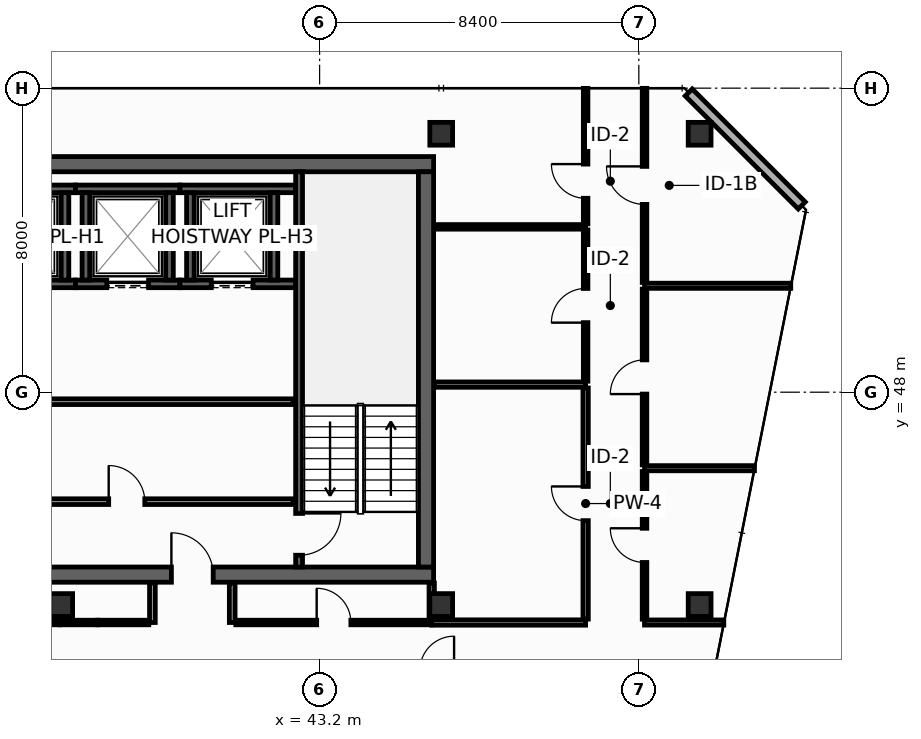
"""IFC4 building model, lengths in metres.
Left out: names, types, materials, properties, quantities, classifications, styles, units other than length and angle.
Written with IfcOpenShell. Run it as: python <this file> out.ifc"""

import sys

from ifc_helpers import new_model, si_unit, direction, frame, frame_2d, origin, origin_2d, place, context, subcontext, project, spatial, rectangle, hollow_rectangle, extrude, element, fill, save


model = new_model("IFC4")
c1 = context("Model", 3, precision=1e-05, world=origin(), true_north=direction((0.0, 1.0)))
c2 = subcontext(c1, "Body", "Model", "MODEL_VIEW")
j1 = project(units=[si_unit("LENGTHUNIT", "METRE"), si_unit("PLANEANGLEUNIT", "RADIAN")], contexts=[c1])
p1 = place(None, origin())
s1 = spatial("IfcSite", under=j1, at=p1, CompositionType="ELEMENT")
p2 = place(p1, origin())
s2 = spatial("IfcBuilding", under=s1, at=p2, CompositionType="ELEMENT")
p3 = place(p2, frame((0.0, 0.0, 306.6)))
s3 = spatial("IfcBuildingStorey", under=s2, at=p3, CompositionType="ELEMENT", Elevation=306.6)
p4 = place(p3, frame((13.7, 43.2, 0.0), z_axis=(0.0, 0.0, 1.0), x_axis=(1.0, 0.0, 0.0)))
e1 = element("IfcWall", 1, at=p4, inside=s3, PredefinedType="SHEAR", context=c2, shape_type="SweptSolid", body=[
    extrude(rectangle(XDim=32.5, YDim=0.4, at=frame_2d((16.25, 0.0))), origin(), (0.0, 0.0, 1.0), 3.55),
])
p5 = place(p4, frame((5.4, 0.0, 0.0)))
e2 = element("IfcOpeningElement", 2, at=p5, cuts=e1, PredefinedType="OPENING", context=c2, shape_type="SweptSolid", body=[
    extrude(rectangle(XDim=1.1, YDim=2.15, at=frame_2d((0.55, 1.075))), frame((0.0, 0.21, 0.0), z_axis=(0.0, -1.0, 0.0), x_axis=(1.0, 0.0, 0.0)), (0.0, 0.0, 1.0), 0.42),
])
p6 = place(p4, frame((25.6, 0.0, 0.0)))
e3 = element("IfcOpeningElement", 3, at=p6, cuts=e1, PredefinedType="OPENING", context=c2, shape_type="SweptSolid", body=[
    extrude(rectangle(XDim=1.1, YDim=2.15, at=frame_2d((0.55, 1.075))), frame((0.0, 0.21, 0.0), z_axis=(0.0, -1.0, 0.0), x_axis=(1.0, 0.0, 0.0)), (0.0, 0.0, 1.0), 0.42),
])
p7 = place(p3, frame((13.7, 54.0, 0.0), z_axis=(0.0, 0.0, 1.0), x_axis=(1.0, 0.0, 0.0)))
e4 = element("IfcWall", 4, at=p7, inside=s3, PredefinedType="SHEAR", context=c2, shape_type="SweptSolid", body=[
    extrude(rectangle(XDim=32.5, YDim=0.4, at=frame_2d((16.25, 0.0))), origin(), (0.0, 0.0, 1.0), 3.55),
])
p8 = place(p3, frame((46.0, 43.4, 0.0), z_axis=(0.0, 0.0, 1.0), x_axis=(0.0, 1.0, 0.0)))
e5 = element("IfcWall", 5, at=p8, inside=s3, PredefinedType="SHEAR", context=c2, shape_type="SweptSolid", body=[
    extrude(rectangle(XDim=10.4, YDim=0.4, at=frame_2d((5.2, 0.0))), origin(), (0.0, 0.0, 1.0), 3.55),
])
for number, where, z_axis, x_axis in (
    (6, (46.4, 54.8, 0.0), (0.0, 0.0, 1.0), (1.0, 0.0, 0.0)),
    (7, (53.2, 54.8, 0.0), (0.0, 0.0, 1.0), (1.0, 0.0, 0.0)),
    (8, (36.4, 42.4, 0.0), (0.0, 0.0, 1.0), (1.0, 0.0, 0.0)),
    (9, (46.4, 42.4, 0.0), (0.0, 0.0, 1.0), (1.0, 0.0, 0.0)),
    (10, (53.2, 42.4, 0.0), (0.0, 0.0, 1.0), (1.0, 0.0, 0.0)),
):
    element("IfcColumn", number, at=place(p3, frame(where, z_axis=z_axis, x_axis=x_axis)), inside=s3, PredefinedType="COLUMN", context=c2, shape_type="SweptSolid", body=[
        extrude(hollow_rectangle(XDim=0.6, YDim=0.6, WallThickness=0.028, at=origin_2d()), origin(), (0.0, 0.0, 1.0), 3.8),
    ])
p9 = place(p3, frame((34.2, 50.85, 0.0), z_axis=(0.0, 0.0, 1.0), x_axis=(1.0, 0.0, 0.0)))
e11 = element("IfcWall", 11, at=p9, inside=s3, PredefinedType="SHEAR", context=c2, shape_type="SweptSolid", body=[
    extrude(rectangle(XDim=2.575, YDim=0.2, at=frame_2d((1.288, 0.0))), origin(), (0.0, 0.0, 1.0), 3.55),
])
p10 = place(p9, frame((0.65, 0.0, 0.0)))
e12 = element("IfcOpeningElement", 12, at=p10, cuts=e11, PredefinedType="OPENING", context=c2, shape_type="SweptSolid", body=[
    extrude(rectangle(XDim=1.1, YDim=2.2, at=frame_2d((0.55, 1.1))), frame((0.0, 0.11, 0.0), z_axis=(0.0, -1.0, 0.0), x_axis=(1.0, 0.0, 0.0)), (0.0, 0.0, 1.0), 0.22),
])
p11 = place(p3, frame((34.2, 53.35, 0.0), z_axis=(0.0, 0.0, 1.0), x_axis=(1.0, 0.0, 0.0)))
e13 = element("IfcWall", 13, at=p11, inside=s3, PredefinedType="SHEAR", context=c2, shape_type="SweptSolid", body=[
    extrude(rectangle(XDim=2.575, YDim=0.2, at=frame_2d((1.288, 0.0))), origin(), (0.0, 0.0, 1.0), 3.55),
])
p12 = place(p3, frame((36.5, 50.95, 0.0), z_axis=(0.0, 0.0, 1.0), x_axis=(0.0, 1.0, 0.0)))
e14 = element("IfcWall", 14, at=p12, inside=s3, PredefinedType="SHEAR", context=c2, shape_type="SweptSolid", body=[
    extrude(rectangle(XDim=2.3, YDim=0.2, at=frame_2d((1.15, 0.0))), origin(), (0.0, 0.0, 1.0), 3.55),
])
p13 = place(p3, frame((36.775, 50.85, 0.0), z_axis=(0.0, 0.0, 1.0), x_axis=(1.0, 0.0, 0.0)))
e15 = element("IfcWall", 15, at=p13, inside=s3, PredefinedType="SHEAR", context=c2, shape_type="SweptSolid", body=[
    extrude(rectangle(XDim=2.75, YDim=0.2, at=frame_2d((1.375, 0.0))), origin(), (0.0, 0.0, 1.0), 3.55),
])
p14 = place(p13, frame((0.825, 0.0, 0.0)))
e16 = element("IfcOpeningElement", 16, at=p14, cuts=e15, PredefinedType="OPENING", context=c2, shape_type="SweptSolid", body=[
    extrude(rectangle(XDim=1.1, YDim=2.2, at=frame_2d((0.55, 1.1))), frame((0.0, 0.11, 0.0), z_axis=(0.0, -1.0, 0.0), x_axis=(1.0, 0.0, 0.0)), (0.0, 0.0, 1.0), 0.22),
])
p15 = place(p3, frame((36.775, 53.35, 0.0), z_axis=(0.0, 0.0, 1.0), x_axis=(1.0, 0.0, 0.0)))
e17 = element("IfcWall", 17, at=p15, inside=s3, PredefinedType="SHEAR", context=c2, shape_type="SweptSolid", body=[
    extrude(rectangle(XDim=2.75, YDim=0.2, at=frame_2d((1.375, 0.0))), origin(), (0.0, 0.0, 1.0), 3.55),
])
for number, where, z_axis, x_axis in (
    (18, (37.05, 50.95, 0.0), (0.0, 0.0, 1.0), (0.0, 1.0, 0.0)),
    (19, (39.25, 50.95, 0.0), (0.0, 0.0, 1.0), (0.0, 1.0, 0.0)),
):
    element("IfcWall", number, at=place(p3, frame(where, z_axis=z_axis, x_axis=x_axis)), inside=s3, PredefinedType="SHEAR", context=c2, shape_type="SweptSolid", body=[
        extrude(rectangle(XDim=2.3, YDim=0.2, at=frame_2d((1.15, 0.0))), origin(), (0.0, 0.0, 1.0), 3.55),
    ])
p16 = place(p3, frame((39.525, 50.85, 0.0), z_axis=(0.0, 0.0, 1.0), x_axis=(1.0, 0.0, 0.0)))
e20 = element("IfcWall", 20, at=p16, inside=s3, PredefinedType="SHEAR", context=c2, shape_type="SweptSolid", body=[
    extrude(rectangle(XDim=3.045, YDim=0.2, at=frame_2d((1.522, 0.0))), origin(), (0.0, 0.0, 1.0), 3.55),
])
p17 = place(p16, frame((0.825, 0.0, 0.0)))
e21 = element("IfcOpeningElement", 21, at=p17, cuts=e20, PredefinedType="OPENING", context=c2, shape_type="SweptSolid", body=[
    extrude(rectangle(XDim=1.1, YDim=2.2, at=frame_2d((0.55, 1.1))), frame((0.0, 0.11, 0.0), z_axis=(0.0, -1.0, 0.0), x_axis=(1.0, 0.0, 0.0)), (0.0, 0.0, 1.0), 0.22),
])
p18 = place(p3, frame((39.525, 53.35, 0.0), z_axis=(0.0, 0.0, 1.0), x_axis=(1.0, 0.0, 0.0)))
e22 = element("IfcWall", 22, at=p18, inside=s3, PredefinedType="SHEAR", context=c2, shape_type="SweptSolid", body=[
    extrude(rectangle(XDim=3.045, YDim=0.2, at=frame_2d((1.522, 0.0))), origin(), (0.0, 0.0, 1.0), 3.55),
])
for number, where, z_axis, x_axis in (
    (23, (39.8, 50.95, 0.0), (0.0, 0.0, 1.0), (0.0, 1.0, 0.0)),
    (24, (42.0, 50.95, 0.0), (0.0, 0.0, 1.0), (0.0, 1.0, 0.0)),
):
    element("IfcWall", number, at=place(p3, frame(where, z_axis=z_axis, x_axis=x_axis)), inside=s3, PredefinedType="SHEAR", context=c2, shape_type="SweptSolid", body=[
        extrude(rectangle(XDim=2.3, YDim=0.2, at=frame_2d((1.15, 0.0))), origin(), (0.0, 0.0, 1.0), 3.55),
    ])
p19 = place(p3, frame((42.66, 53.8, 0.0), z_axis=(0.0, 0.0, 1.0), x_axis=(0.0, -1.0, 0.0)))
e25 = element("IfcWall", 25, at=p19, inside=s3, PredefinedType="SHEAR", context=c2, shape_type="SweptSolid", body=[
    extrude(rectangle(XDim=10.4, YDim=0.18, at=frame_2d((5.2, 0.0))), origin(), (0.0, 0.0, 1.0), 3.55),
])
p20 = place(p19, frame((8.99, 0.0, 0.0)))
e26 = element("IfcOpeningElement", 26, at=p20, cuts=e25, PredefinedType="OPENING", context=c2, shape_type="SweptSolid", body=[
    extrude(rectangle(XDim=1.1, YDim=2.15, at=frame_2d((0.55, 1.075))), frame((0.0, 0.1, 0.0), z_axis=(0.0, -1.0, 0.0), x_axis=(1.0, 0.0, 0.0)), (0.0, 0.0, 1.0), 0.2),
])
p21 = place(p3, frame((34.05, 45.12, 0.0), z_axis=(0.0, 0.0, 1.0), x_axis=(1.0, 0.0, 0.0)))
e27 = element("IfcWall", 27, at=p21, inside=s3, PredefinedType="PARTITIONING", context=c2, shape_type="SweptSolid", body=[
    extrude(rectangle(XDim=8.45, YDim=0.15, at=frame_2d((4.225, 0.0))), origin(), (0.0, 0.0, 1.0), 3.55),
])
p22 = place(p21, frame((3.6, 0.0, 0.0)))
e28 = element("IfcOpeningElement", 28, at=p22, cuts=e27, PredefinedType="OPENING", context=c2, shape_type="SweptSolid", body=[
    extrude(rectangle(XDim=0.95, YDim=2.15, at=frame_2d((0.475, 1.075))), frame((0.0, 0.085, 0.0), z_axis=(0.0, -1.0, 0.0), x_axis=(1.0, 0.0, 0.0)), (0.0, 0.0, 1.0), 0.17),
])
p23 = place(p3, frame((34.05, 47.75, 0.0), z_axis=(0.0, 0.0, 1.0), x_axis=(1.0, 0.0, 0.0)))
e29 = element("IfcWall", 29, at=p23, inside=s3, PredefinedType="PARTITIONING", context=c2, shape_type="SweptSolid", body=[
    extrude(rectangle(XDim=8.45, YDim=0.15, at=frame_2d((4.225, 0.0))), origin(), (0.0, 0.0, 1.0), 3.55),
])
p24 = place(p3, frame((55.887, 52.913, 0.0), z_axis=(0.0, 0.0, 1.0), x_axis=(-0.707106781187, 0.707106781187, 0.0)))
e30 = element("IfcWall", 30, at=p24, inside=s3, PredefinedType="STANDARD", context=c2, shape_type="SweptSolid", body=[
    extrude(rectangle(XDim=4.206, YDim=0.26, at=frame_2d((2.103, 0.0))), origin(), (0.0, 0.0, 1.0), 3.55),
])
p25 = place(p3, frame((46.15, 41.94, 0.0), z_axis=(0.0, 0.0, 1.0), x_axis=(1.0, 0.0, 0.0)))
e31 = element("IfcWall", 31, at=p25, inside=s3, PredefinedType="PARTITIONING", context=c2, shape_type="SweptSolid", body=[
    extrude(rectangle(XDim=4.05, YDim=0.14, at=frame_2d((2.025, 0.0))), origin(), (0.0, 0.0, 1.0), 3.55),
])
p26 = place(p3, frame((46.15, 42.03, 0.0), z_axis=(0.0, 0.0, 1.0), x_axis=(0.0, 1.0, 0.0)))
e32 = element("IfcWall", 32, at=p26, inside=s3, PredefinedType="PARTITIONING", context=c2, shape_type="SweptSolid", body=[
    extrude(rectangle(XDim=0.95, YDim=0.14, at=frame_2d((0.475, 0.0))), origin(), (0.0, 0.0, 1.0), 3.55),
])
p27 = place(p3, frame((46.22, 48.2, 0.0), z_axis=(0.0, 0.0, 1.0), x_axis=(1.0, 0.0, 0.0)))
e33 = element("IfcWall", 33, at=p27, inside=s3, PredefinedType="PARTITIONING", context=c2, shape_type="SweptSolid", body=[
    extrude(rectangle(XDim=3.98, YDim=0.14, at=frame_2d((1.99, 0.0))), origin(), (0.0, 0.0, 1.0), 3.55),
])
p28 = place(p3, frame((50.2, 42.03, 0.0), z_axis=(0.0, 0.0, 1.0), x_axis=(0.0, 1.0, 0.0)))
e34 = element("IfcWall", 34, at=p28, inside=s3, PredefinedType="PARTITIONING", context=c2, shape_type="SweptSolid", body=[
    extrude(rectangle(XDim=6.08, YDim=0.14, at=frame_2d((3.04, 0.0))), origin(), (0.0, 0.0, 1.0), 2.947),
])
p29 = place(p28, frame((2.59, 0.0, 0.0)))
e35 = element("IfcOpeningElement", 35, at=p29, cuts=e34, PredefinedType="OPENING", context=c2, shape_type="SweptSolid", body=[
    extrude(rectangle(XDim=0.9, YDim=2.1, at=frame_2d((0.45, 1.05))), frame((0.0, 0.08, 0.0), z_axis=(0.0, -1.0, 0.0), x_axis=(1.0, 0.0, 0.0)), (0.0, 0.0, 1.0), 0.16),
])
p30 = place(p3, frame((46.22, 52.35, 0.0), z_axis=(0.0, 0.0, 1.0), x_axis=(1.0, 0.0, 0.0)))
e36 = element("IfcWall", 36, at=p30, inside=s3, PredefinedType="PARTITIONING", context=c2, shape_type="SweptSolid", body=[
    extrude(rectangle(XDim=3.98, YDim=0.12, at=frame_2d((1.99, 0.0))), origin(), (0.0, 0.0, 1.0), 3.55),
])
p31 = place(p3, frame((50.2, 48.29, 0.0), z_axis=(0.0, 0.0, 1.0), x_axis=(0.0, 1.0, 0.0)))
e37 = element("IfcWall", 37, at=p31, inside=s3, PredefinedType="PARTITIONING", context=c2, shape_type="SweptSolid", body=[
    extrude(rectangle(XDim=3.98, YDim=0.12, at=frame_2d((1.99, 0.0))), origin(), (0.0, 0.0, 1.0), 3.55),
])
p32 = place(p31, frame((1.54, 0.0, 0.0)))
e38 = element("IfcOpeningElement", 38, at=p32, cuts=e37, PredefinedType="OPENING", context=c2, shape_type="SweptSolid", body=[
    extrude(rectangle(XDim=0.9, YDim=2.1, at=frame_2d((0.45, 1.05))), frame((0.0, 0.07, 0.0), z_axis=(0.0, -1.0, 0.0), x_axis=(1.0, 0.0, 0.0)), (0.0, 0.0, 1.0), 0.14),
])
p33 = place(p3, frame((50.2, 52.43, 0.0), z_axis=(0.0, 0.0, 1.0), x_axis=(0.0, 1.0, 0.0)))
e39 = element("IfcWall", 39, at=p33, inside=s3, PredefinedType="PARTITIONING", context=c2, shape_type="SweptSolid", body=[
    extrude(rectangle(XDim=3.565, YDim=0.12, at=frame_2d((1.783, 0.0))), origin(), (0.0, 0.0, 1.0), 2.935),
])
p34 = place(p33, frame((0.672, 0.0, 0.0)))
e40 = element("IfcOpeningElement", 40, at=p34, cuts=e39, PredefinedType="OPENING", context=c2, shape_type="SweptSolid", body=[
    extrude(rectangle(XDim=0.9, YDim=2.1, at=frame_2d((0.45, 1.05))), frame((0.0, 0.07, 0.0), z_axis=(0.0, -1.0, 0.0), x_axis=(1.0, 0.0, 0.0)), (0.0, 0.0, 1.0), 0.14),
])
p35 = place(p3, frame((51.75, 41.94, 0.0), z_axis=(0.0, 0.0, 1.0), x_axis=(1.0, 0.0, 0.0)))
e41 = element("IfcWall", 41, at=p35, inside=s3, PredefinedType="PARTITIONING", context=c2, shape_type="SweptSolid", body=[
    extrude(rectangle(XDim=2.086, YDim=0.135, at=frame_2d((1.043, 0.0))), origin(), (0.0, 0.0, 1.0), 1.735),
])
p36 = place(p3, frame((51.75, 46.0, 0.0), z_axis=(0.0, 0.0, 1.0), x_axis=(1.0, 0.0, 0.0)))
e42 = element("IfcWall", 42, at=p36, inside=s3, PredefinedType="PARTITIONING", context=c2, shape_type="SweptSolid", body=[
    extrude(rectangle(XDim=2.893, YDim=0.135, at=frame_2d((1.446, 0.0))), origin(), (0.0, 0.0, 1.0), 2.947),
])
p37 = place(p3, frame((51.75, 50.8, 0.0), z_axis=(0.0, 0.0, 1.0), x_axis=(1.0, 0.0, 0.0)))
e43 = element("IfcWall", 43, at=p37, inside=s3, PredefinedType="PARTITIONING", context=c2, shape_type="SweptSolid", body=[
    extrude(rectangle(XDim=3.847, YDim=0.135, at=frame_2d((1.924, 0.0))), origin(), (0.0, 0.0, 1.0), 2.947),
])
p38 = place(p3, frame((51.75, 42.028, 0.0), z_axis=(0.0, 0.0, 1.0), x_axis=(0.0, 1.0, 0.0)))
e44 = element("IfcWall", 44, at=p38, inside=s3, PredefinedType="PARTITIONING", context=c2, shape_type="SweptSolid", body=[
    extrude(rectangle(XDim=3.885, YDim=0.12, at=frame_2d((1.942, 0.0))), origin(), (0.0, 0.0, 1.0), 2.947),
])
p39 = place(p38, frame((1.492, 0.0, 0.0)))
e45 = element("IfcOpeningElement", 45, at=p39, cuts=e44, PredefinedType="OPENING", context=c2, shape_type="SweptSolid", body=[
    extrude(rectangle(XDim=0.9, YDim=2.1, at=frame_2d((0.45, 1.05))), frame((0.0, 0.07, 0.0), z_axis=(0.0, -1.0, 0.0), x_axis=(1.0, 0.0, 0.0)), (0.0, 0.0, 1.0), 0.14),
])
p40 = place(p3, frame((51.75, 46.087, 0.0), z_axis=(0.0, 0.0, 1.0), x_axis=(0.0, 1.0, 0.0)))
e46 = element("IfcWall", 46, at=p40, inside=s3, PredefinedType="PARTITIONING", context=c2, shape_type="SweptSolid", body=[
    extrude(rectangle(XDim=4.625, YDim=0.12, at=frame_2d((2.312, 0.0))), origin(), (0.0, 0.0, 1.0), 3.55),
])
p41 = place(p40, frame((1.863, 0.0, 0.0)))
e47 = element("IfcOpeningElement", 47, at=p41, cuts=e46, PredefinedType="OPENING", context=c2, shape_type="SweptSolid", body=[
    extrude(rectangle(XDim=0.9, YDim=2.1, at=frame_2d((0.45, 1.05))), frame((0.0, 0.07, 0.0), z_axis=(0.0, -1.0, 0.0), x_axis=(1.0, 0.0, 0.0)), (0.0, 0.0, 1.0), 0.14),
])
p42 = place(p3, frame((51.75, 50.887, 0.0), z_axis=(0.0, 0.0, 1.0), x_axis=(0.0, 1.0, 0.0)))
e48 = element("IfcWall", 48, at=p42, inside=s3, PredefinedType="PARTITIONING", context=c2, shape_type="SweptSolid", body=[
    extrude(rectangle(XDim=5.108, YDim=0.12, at=frame_2d((2.554, 0.0))), origin(), (0.0, 0.0, 1.0), 2.935),
])
p43 = place(p42, frame((2.054, 0.0, 0.0)))
e49 = element("IfcOpeningElement", 49, at=p43, cuts=e48, PredefinedType="OPENING", context=c2, shape_type="SweptSolid", body=[
    extrude(rectangle(XDim=1.0, YDim=2.15, at=frame_2d((0.5, 1.075))), frame((0.0, 0.07, 0.0), z_axis=(0.0, -1.0, 0.0), x_axis=(1.0, 0.0, 0.0)), (0.0, 0.0, 1.0), 0.14),
])
for number, where, z_axis, x_axis in (
    (50, (38.8, 41.94, 0.0), (0.0, 0.0, 1.0), (0.0, 1.0, 0.0)),
    (51, (40.9, 41.94, 0.0), (0.0, 0.0, 1.0), (0.0, 1.0, 0.0)),
):
    element("IfcWall", number, at=place(p3, frame(where, z_axis=z_axis, x_axis=x_axis)), inside=s3, PredefinedType="PARTITIONING", context=c2, shape_type="SweptSolid", body=[
        extrude(rectangle(XDim=1.04, YDim=0.15, at=frame_2d((0.52, 0.0))), origin(), (0.0, 0.0, 1.0), 3.55),
    ])
p44 = place(p3, frame((23.642, 41.94, 0.0), z_axis=(0.0, 0.0, 1.0), x_axis=(1.0, 0.0, 0.0)))
e52 = element("IfcWall", 52, at=p44, inside=s3, PredefinedType="PARTITIONING", context=c2, shape_type="SweptSolid", body=[
    extrude(rectangle(XDim=12.715, YDim=0.12, at=frame_2d((6.358, 0.0))), origin(), (0.0, 0.0, 1.0), 3.55),
])
p45 = place(p44, frame((5.908, 0.0, 0.0)))
e53 = element("IfcOpeningElement", 53, at=p45, cuts=e52, PredefinedType="OPENING", context=c2, shape_type="SweptSolid", body=[
    extrude(rectangle(XDim=0.9, YDim=2.1, at=frame_2d((0.45, 1.05))), frame((0.0, 0.07, 0.0), z_axis=(0.0, -1.0, 0.0), x_axis=(1.0, 0.0, 0.0)), (0.0, 0.0, 1.0), 0.14),
])
p46 = place(p3, frame((37.361, 41.94, 0.0), z_axis=(0.0, 0.0, 1.0), x_axis=(1.0, 0.0, 0.0)))
e54 = element("IfcWall", 54, at=p46, inside=s3, PredefinedType="PARTITIONING", context=c2, shape_type="SweptSolid", body=[
    extrude(rectangle(XDim=1.344, YDim=0.12, at=frame_2d((0.672, 0.0))), origin(), (0.0, 0.0, 1.0), 3.55),
])
p47 = place(p3, frame((36.358, 41.94, 0.0), z_axis=(0.0, 0.0, 1.0), x_axis=(1.0, 0.0, 0.0)))
e55 = element("IfcWall", 55, at=p47, inside=s3, PredefinedType="PARTITIONING", context=c2, shape_type="SweptSolid", body=[
    extrude(rectangle(XDim=1.003, YDim=0.12, at=frame_2d((0.501, 0.0))), origin(), (0.0, 0.0, 1.0), 1.735),
])
p48 = place(p3, frame((40.995, 41.94, 0.0), z_axis=(0.0, 0.0, 1.0), x_axis=(1.0, 0.0, 0.0)))
e56 = element("IfcWall", 56, at=p48, inside=s3, PredefinedType="PARTITIONING", context=c2, shape_type="SweptSolid", body=[
    extrude(rectangle(XDim=5.155, YDim=0.12, at=frame_2d((2.577, 0.0))), origin(), (0.0, 0.0, 1.0), 3.55),
])
p49 = place(p48, frame((2.128, 0.0, 0.0)))
e57 = element("IfcOpeningElement", 57, at=p49, cuts=e56, PredefinedType="OPENING", context=c2, shape_type="SweptSolid", body=[
    extrude(rectangle(XDim=0.9, YDim=2.1, at=frame_2d((0.45, 1.05))), frame((0.0, 0.07, 0.0), z_axis=(0.0, -1.0, 0.0), x_axis=(1.0, 0.0, 0.0)), (0.0, 0.0, 1.0), 0.14),
])
p50 = place(p14, origin())
e58 = element("IfcDoor", 58, at=p50, inside=s3, OperationType="SLIDING_TO_LEFT", PredefinedType="DOOR", context=c2, shape_type="SweptSolid", body=[
    extrude(rectangle(XDim=1.1, YDim=2.2, at=frame_2d((0.55, 1.1))), frame((0.0, 0.025, 0.0), z_axis=(0.0, -1.0, 0.0), x_axis=(1.0, 0.0, 0.0)), (0.0, 0.0, 1.0), 0.05),
])
fill(e16, e58)
p51 = place(p17, origin())
e59 = element("IfcDoor", 59, at=p51, inside=s3, OperationType="SLIDING_TO_LEFT", PredefinedType="DOOR", context=c2, shape_type="SweptSolid", body=[
    extrude(rectangle(XDim=1.1, YDim=2.2, at=frame_2d((0.55, 1.1))), frame((0.0, 0.025, 0.0), z_axis=(0.0, -1.0, 0.0), x_axis=(1.0, 0.0, 0.0)), (0.0, 0.0, 1.0), 0.05),
])
fill(e21, e59)
p52 = place(p20, origin())
e60 = element("IfcDoor", 60, at=p52, inside=s3, OperationType="SINGLE_SWING_LEFT", PredefinedType="DOOR", context=c2, shape_type="SweptSolid", body=[
    extrude(rectangle(XDim=1.1, YDim=2.15, at=frame_2d((0.55, 1.075))), frame((0.0, 0.025, 0.0), z_axis=(0.0, -1.0, 0.0), x_axis=(1.0, 0.0, 0.0)), (0.0, 0.0, 1.0), 0.05),
])
fill(e26, e60)
p53 = place(p6, origin())
e61 = element("IfcDoor", 61, at=p53, inside=s3, OperationType="SINGLE_SWING_LEFT", PredefinedType="DOOR", context=c2, shape_type="SweptSolid", body=[
    extrude(rectangle(XDim=1.1, YDim=2.15, at=frame_2d((0.55, 1.075))), frame((0.0, 0.025, 0.0), z_axis=(0.0, -1.0, 0.0), x_axis=(1.0, 0.0, 0.0)), (0.0, 0.0, 1.0), 0.05),
])
fill(e3, e61)
p54 = place(p22, origin())
e62 = element("IfcDoor", 62, at=p54, inside=s3, OperationType="SINGLE_SWING_LEFT", PredefinedType="DOOR", context=c2, shape_type="SweptSolid", body=[
    extrude(rectangle(XDim=0.95, YDim=2.15, at=frame_2d((0.475, 1.075))), frame((0.0, 0.025, 0.0), z_axis=(0.0, -1.0, 0.0), x_axis=(1.0, 0.0, 0.0)), (0.0, 0.0, 1.0), 0.05),
])
fill(e28, e62)
p55 = place(p29, origin())
e63 = element("IfcDoor", 63, at=p55, inside=s3, OperationType="SINGLE_SWING_RIGHT", PredefinedType="DOOR", context=c2, shape_type="SweptSolid", body=[
    extrude(rectangle(XDim=0.9, YDim=2.1, at=frame_2d((0.45, 1.05))), frame((0.0, 0.025, 0.0), z_axis=(0.0, -1.0, 0.0), x_axis=(1.0, 0.0, 0.0)), (0.0, 0.0, 1.0), 0.05),
])
fill(e35, e63)
p56 = place(p32, origin())
e64 = element("IfcDoor", 64, at=p56, inside=s3, OperationType="SINGLE_SWING_LEFT", PredefinedType="DOOR", context=c2, shape_type="SweptSolid", body=[
    extrude(rectangle(XDim=0.9, YDim=2.1, at=frame_2d((0.45, 1.05))), frame((0.0, 0.025, 0.0), z_axis=(0.0, -1.0, 0.0), x_axis=(1.0, 0.0, 0.0)), (0.0, 0.0, 1.0), 0.05),
])
fill(e38, e64)
p57 = place(p34, origin())
e65 = element("IfcDoor", 65, at=p57, inside=s3, OperationType="SINGLE_SWING_RIGHT", PredefinedType="DOOR", context=c2, shape_type="SweptSolid", body=[
    extrude(rectangle(XDim=0.9, YDim=2.1, at=frame_2d((0.45, 1.05))), frame((0.0, 0.025, 0.0), z_axis=(0.0, -1.0, 0.0), x_axis=(1.0, 0.0, 0.0)), (0.0, 0.0, 1.0), 0.05),
])
fill(e40, e65)
p58 = place(p39, origin())
e66 = element("IfcDoor", 66, at=p58, inside=s3, OperationType="SINGLE_SWING_RIGHT", PredefinedType="DOOR", context=c2, shape_type="SweptSolid", body=[
    extrude(rectangle(XDim=0.9, YDim=2.1, at=frame_2d((0.45, 1.05))), frame((0.0, 0.025, 0.0), z_axis=(0.0, -1.0, 0.0), x_axis=(1.0, 0.0, 0.0)), (0.0, 0.0, 1.0), 0.05),
])
fill(e45, e66)
p59 = place(p41, origin())
e67 = element("IfcDoor", 67, at=p59, inside=s3, OperationType="SINGLE_SWING_LEFT", PredefinedType="DOOR", context=c2, shape_type="SweptSolid", body=[
    extrude(rectangle(XDim=0.9, YDim=2.1, at=frame_2d((0.45, 1.05))), frame((0.0, 0.025, 0.0), z_axis=(0.0, -1.0, 0.0), x_axis=(1.0, 0.0, 0.0)), (0.0, 0.0, 1.0), 0.05),
])
fill(e47, e67)
p60 = place(p43, origin())
e68 = element("IfcDoor", 68, at=p60, inside=s3, OperationType="SINGLE_SWING_RIGHT", PredefinedType="DOOR", context=c2, shape_type="SweptSolid", body=[
    extrude(rectangle(XDim=1.0, YDim=2.15, at=frame_2d((0.5, 1.075))), frame((0.0, 0.025, 0.0), z_axis=(0.0, -1.0, 0.0), x_axis=(1.0, 0.0, 0.0)), (0.0, 0.0, 1.0), 0.05),
])
fill(e49, e68)
p61 = place(p49, origin())
e69 = element("IfcDoor", 69, at=p61, inside=s3, OperationType="SINGLE_SWING_LEFT", PredefinedType="DOOR", context=c2, shape_type="SweptSolid", body=[
    extrude(rectangle(XDim=0.9, YDim=2.1, at=frame_2d((0.45, 1.05))), frame((0.0, 0.025, 0.0), z_axis=(0.0, -1.0, 0.0), x_axis=(1.0, 0.0, 0.0)), (0.0, 0.0, 1.0), 0.05),
])
fill(e57, e69)
save(model, sys.argv[1])
